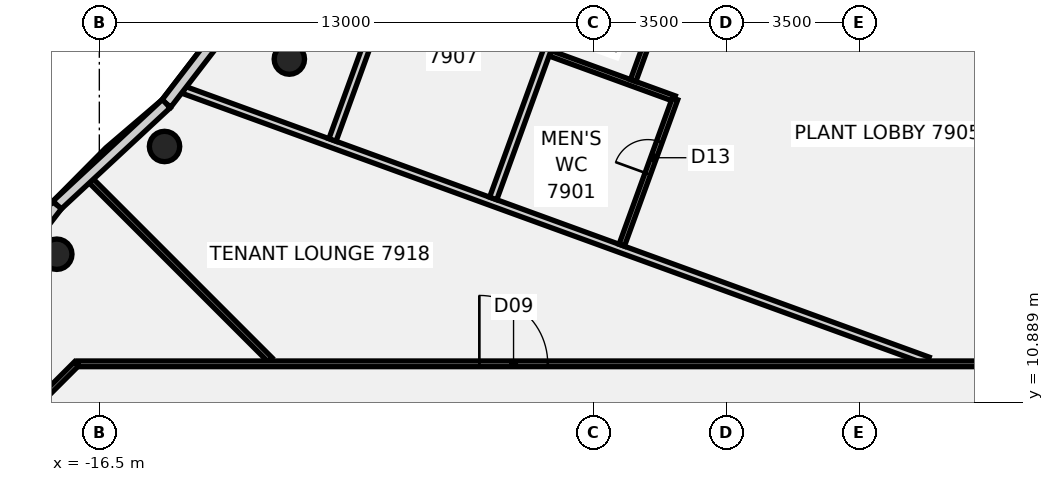
"""IFC4 building model, lengths in metres.
Left out: names, types, materials, properties, quantities, classifications, styles, units other than length and angle.
Written with IfcOpenShell. Run it as: python <this file> out.ifc"""

import sys

from ifc_helpers import new_model, si_unit, direction, frame, frame_2d, origin, origin_2d, place, context, subcontext, project, spatial, rectangle, circle, extrude, element, fill, save


model = new_model("IFC4")
c1 = context("Model", 3, precision=1e-05, world=origin(), true_north=direction((0.0, 1.0)))
c2 = subcontext(c1, "Body", "Model", "MODEL_VIEW")
j1 = project(units=[si_unit("LENGTHUNIT", "METRE"), si_unit("PLANEANGLEUNIT", "RADIAN")], contexts=[c1])
p1 = place(None, origin())
s1 = spatial("IfcSite", under=j1, at=p1, CompositionType="ELEMENT")
p2 = place(p1, origin())
s2 = spatial("IfcBuilding", under=s1, at=p2, CompositionType="ELEMENT")
p3 = place(p2, frame((0.0, 0.0, 321.4)))
s3 = spatial("IfcBuildingStorey", under=s2, at=p3, CompositionType="ELEMENT", Elevation=321.4)
for number, where, z_axis, x_axis in (
    (1, (-11.5, 19.919, -0.18), (0.0, 0.0, 1.0), (1.0, 0.0, 0.0)),
    (2, (-14.784, 17.619, -0.18), (0.0, 0.0, 1.0), (1.0, 0.0, 0.0)),
    (3, (-17.619, 14.784, -0.18), (0.0, 0.0, 1.0), (1.0, 0.0, 0.0)),
):
    element("IfcColumn", number, at=place(p3, frame(where, z_axis=z_axis, x_axis=x_axis)), inside=s3, PredefinedType="COLUMN", context=c2, shape_type="SweptSolid", body=[
        extrude(circle(Radius=0.4, at=origin_2d()), origin(), (0.0, 0.0, 1.0), 4.0),
    ])
p4 = place(p3, frame((-16.921, 16.921, 0.0), z_axis=(0.0, 0.0, 1.0), x_axis=(0.707106781187, -0.707106781187, 0.0)))
e4 = element("IfcWall", 4, at=p4, inside=s3, PredefinedType="PARTITIONING", context=c2, shape_type="SweptSolid", body=[
    extrude(rectangle(XDim=6.946, YDim=0.15, at=frame_2d((3.473, 0.0))), origin(), (0.0, 0.0, 1.0), 3.22),
])
p5 = place(p3, frame((-14.271, 19.106, 0.0), z_axis=(0.0, 0.0, 1.0), x_axis=(0.939707843555, -0.341978316216, 0.0)))
e5 = element("IfcWall", 5, at=p5, inside=s3, PredefinedType="PARTITIONING", context=c2, shape_type="SweptSolid", body=[
    extrude(rectangle(XDim=20.83, YDim=0.2, at=frame_2d((10.415, 0.0))), origin(), (0.0, 0.0, 1.0), 3.22),
])
p6 = place(p3, frame((-4.64, 20.071, 0.0), z_axis=(0.0, 0.0, 1.0), x_axis=(0.939625353143, -0.342204903138, 0.0)))
e6 = element("IfcWall", 6, at=p6, inside=s3, PredefinedType="PARTITIONING", context=c2, shape_type="SweptSolid", body=[
    extrude(rectangle(XDim=3.48, YDim=0.15, at=frame_2d((1.74, 0.0))), origin(), (0.0, 0.0, 1.0), 3.22),
])
p7 = place(p3, frame((-17.065, 11.9, 0.0), z_axis=(0.0, 0.0, 1.0), x_axis=(1.0, 0.0, 0.0)))
e7 = element("IfcWall", 7, at=p7, inside=s3, PredefinedType="PARTITIONING", context=c2, shape_type="SweptSolid", body=[
    extrude(rectangle(XDim=34.165, YDim=0.15, at=frame_2d((17.083, 0.0))), origin(), (0.0, 0.0, 1.0), 3.22),
])
p8 = place(p7, frame((24.544, 0.0, 0.0)))
e8 = element("IfcOpeningElement", 8, at=p8, cuts=e7, PredefinedType="OPENING", context=c2, shape_type="SweptSolid", body=[
    extrude(rectangle(XDim=1.8, YDim=2.1, at=frame_2d((0.9, 1.05))), frame((0.0, 0.085, 0.0), z_axis=(0.0, -1.0, 0.0), x_axis=(1.0, 0.0, 0.0)), (0.0, 0.0, 1.0), 0.17),
])
p9 = place(p7, frame((10.565, 0.0, 0.0)))
e9 = element("IfcOpeningElement", 9, at=p9, cuts=e7, PredefinedType="OPENING", context=c2, shape_type="SweptSolid", body=[
    extrude(rectangle(XDim=1.8, YDim=2.1, at=frame_2d((0.9, 1.05))), frame((0.0, 0.085, 0.0), z_axis=(0.0, -1.0, 0.0), x_axis=(1.0, 0.0, 0.0)), (0.0, 0.0, 1.0), 0.17),
])
p10 = place(p3, frame((-18.872, 10.128, 0.0), z_axis=(0.0, 0.0, 1.0), x_axis=(0.707106781187, 0.707106781187, 0.0)))
e10 = element("IfcWall", 10, at=p10, inside=s3, PredefinedType="PARTITIONING", context=c2, shape_type="SweptSolid", body=[
    extrude(rectangle(XDim=2.505, YDim=0.15, at=frame_2d((1.253, 0.0))), origin(), (0.0, 0.0, 1.0), 3.22),
])
p11 = place(p3, frame((-10.365, 17.791, 0.0), z_axis=(0.0, 0.0, 1.0), x_axis=(0.342032792834, 0.939688016645, 0.0)))
e11 = element("IfcWall", 11, at=p11, inside=s3, PredefinedType="PARTITIONING", context=c2, shape_type="SweptSolid", body=[
    extrude(rectangle(XDim=8.66, YDim=0.2, at=frame_2d((4.33, 0.0))), origin(), (0.0, 0.0, 1.0), 3.22),
])
p12 = place(p11, frame((6.6, 0.0, 0.0)))
e12 = element("IfcOpeningElement", 12, at=p12, cuts=e11, PredefinedType="OPENING", context=c2, shape_type="SweptSolid", body=[
    extrude(rectangle(XDim=1.4, YDim=2.1, at=frame_2d((0.7, 1.05))), frame((0.0, 0.11, 0.0), z_axis=(0.0, -1.0, 0.0), x_axis=(1.0, 0.0, 0.0)), (0.0, 0.0, 1.0), 0.22),
])
p13 = place(p3, frame((-6.136, 16.252, 0.0), z_axis=(0.0, 0.0, 1.0), x_axis=(0.341890434998, 0.939739820619, 0.0)))
e13 = element("IfcWall", 13, at=p13, inside=s3, PredefinedType="PARTITIONING", context=c2, shape_type="SweptSolid", body=[
    extrude(rectangle(XDim=6.518, YDim=0.2, at=frame_2d((3.259, 0.0))), origin(), (0.0, 0.0, 1.0), 3.22),
])
p14 = place(p3, frame((-2.753, 15.021, 0.0), z_axis=(0.0, 0.0, 1.0), x_axis=(0.341929559358, 0.939725585709, 0.0)))
e14 = element("IfcWall", 14, at=p14, inside=s3, PredefinedType="PARTITIONING", context=c2, shape_type="SweptSolid", body=[
    extrude(rectangle(XDim=4.099, YDim=0.15, at=frame_2d((2.05, 0.0))), origin(), (0.0, 0.0, 1.0), 3.22),
])
p15 = place(p14, frame((2.0, 0.0, 0.0)))
e15 = element("IfcOpeningElement", 15, at=p15, cuts=e14, PredefinedType="OPENING", context=c2, shape_type="SweptSolid", body=[
    extrude(rectangle(XDim=0.9, YDim=2.1, at=frame_2d((0.45, 1.05))), frame((0.0, 0.085, 0.0), z_axis=(0.0, -1.0, 0.0), x_axis=(1.0, 0.0, 0.0)), (0.0, 0.0, 1.0), 0.17),
])
p16 = place(p3, frame((-2.452, 19.354, 0.0), z_axis=(0.0, 0.0, 1.0), x_axis=(0.341765797908, 0.939785155969, 0.0)))
e16 = element("IfcWall", 16, at=p16, inside=s3, PredefinedType="PARTITIONING", context=c2, shape_type="SweptSolid", body=[
    extrude(rectangle(XDim=1.724, YDim=0.15, at=frame_2d((0.862, 0.0))), origin(), (0.0, 0.0, 1.0), 3.22),
])
p17 = place(p3, frame((-13.409, 20.474, 0.0), z_axis=(0.0, 0.0, 1.0), x_axis=(-0.609396950442, -0.792865282877, 0.0)))
e17 = element("IfcWall", 17, at=p17, inside=s3, PredefinedType="SOLIDWALL", context=c2, shape_type="SweptSolid", body=[
    extrude(rectangle(XDim=2.181, YDim=0.3, at=frame_2d((1.09, 0.0))), origin(), (0.0, 0.0, 1.0), 3.82),
])
p18 = place(p3, frame((-14.739, 18.745, 0.0), z_axis=(0.0, 0.0, 1.0), x_axis=(-0.73266715928, -0.680587124263, 0.0)))
e18 = element("IfcWall", 18, at=p18, inside=s3, PredefinedType="SOLIDWALL", context=c2, shape_type="SweptSolid", body=[
    extrude(rectangle(XDim=3.924, YDim=0.3, at=frame_2d((1.962, 0.0))), origin(), (0.0, 0.0, 1.0), 3.82),
])
p19 = place(p3, frame((-17.613, 16.075, 0.0), z_axis=(0.0, 0.0, 1.0), x_axis=(-0.610785688376, -0.79179596038, 0.0)))
e19 = element("IfcWall", 19, at=p19, inside=s3, PredefinedType="SOLIDWALL", context=c2, shape_type="SweptSolid", body=[
    extrude(rectangle(XDim=3.938, YDim=0.3, at=frame_2d((1.969, 0.0))), origin(), (0.0, 0.0, 1.0), 3.82),
])
p20 = place(p9, origin())
e20 = element("IfcDoor", 20, at=p20, inside=s3, OperationType="DOUBLE_DOOR_SINGLE_SWING", PredefinedType="DOOR", context=c2, shape_type="SweptSolid", body=[
    extrude(rectangle(XDim=1.8, YDim=2.1, at=frame_2d((0.9, 1.05))), frame((0.0, 0.025, 0.0), z_axis=(0.0, -1.0, 0.0), x_axis=(1.0, 0.0, 0.0)), (0.0, 0.0, 1.0), 0.05),
])
fill(e9, e20)
p21 = place(p15, origin())
e21 = element("IfcDoor", 21, at=p21, inside=s3, OperationType="SINGLE_SWING_LEFT", PredefinedType="DOOR", context=c2, shape_type="SweptSolid", body=[
    extrude(rectangle(XDim=0.9, YDim=2.1, at=frame_2d((0.45, 1.05))), frame((0.0, 0.025, 0.0), z_axis=(0.0, -1.0, 0.0), x_axis=(1.0, 0.0, 0.0)), (0.0, 0.0, 1.0), 0.05),
])
fill(e15, e21)
save(model, sys.argv[1])
